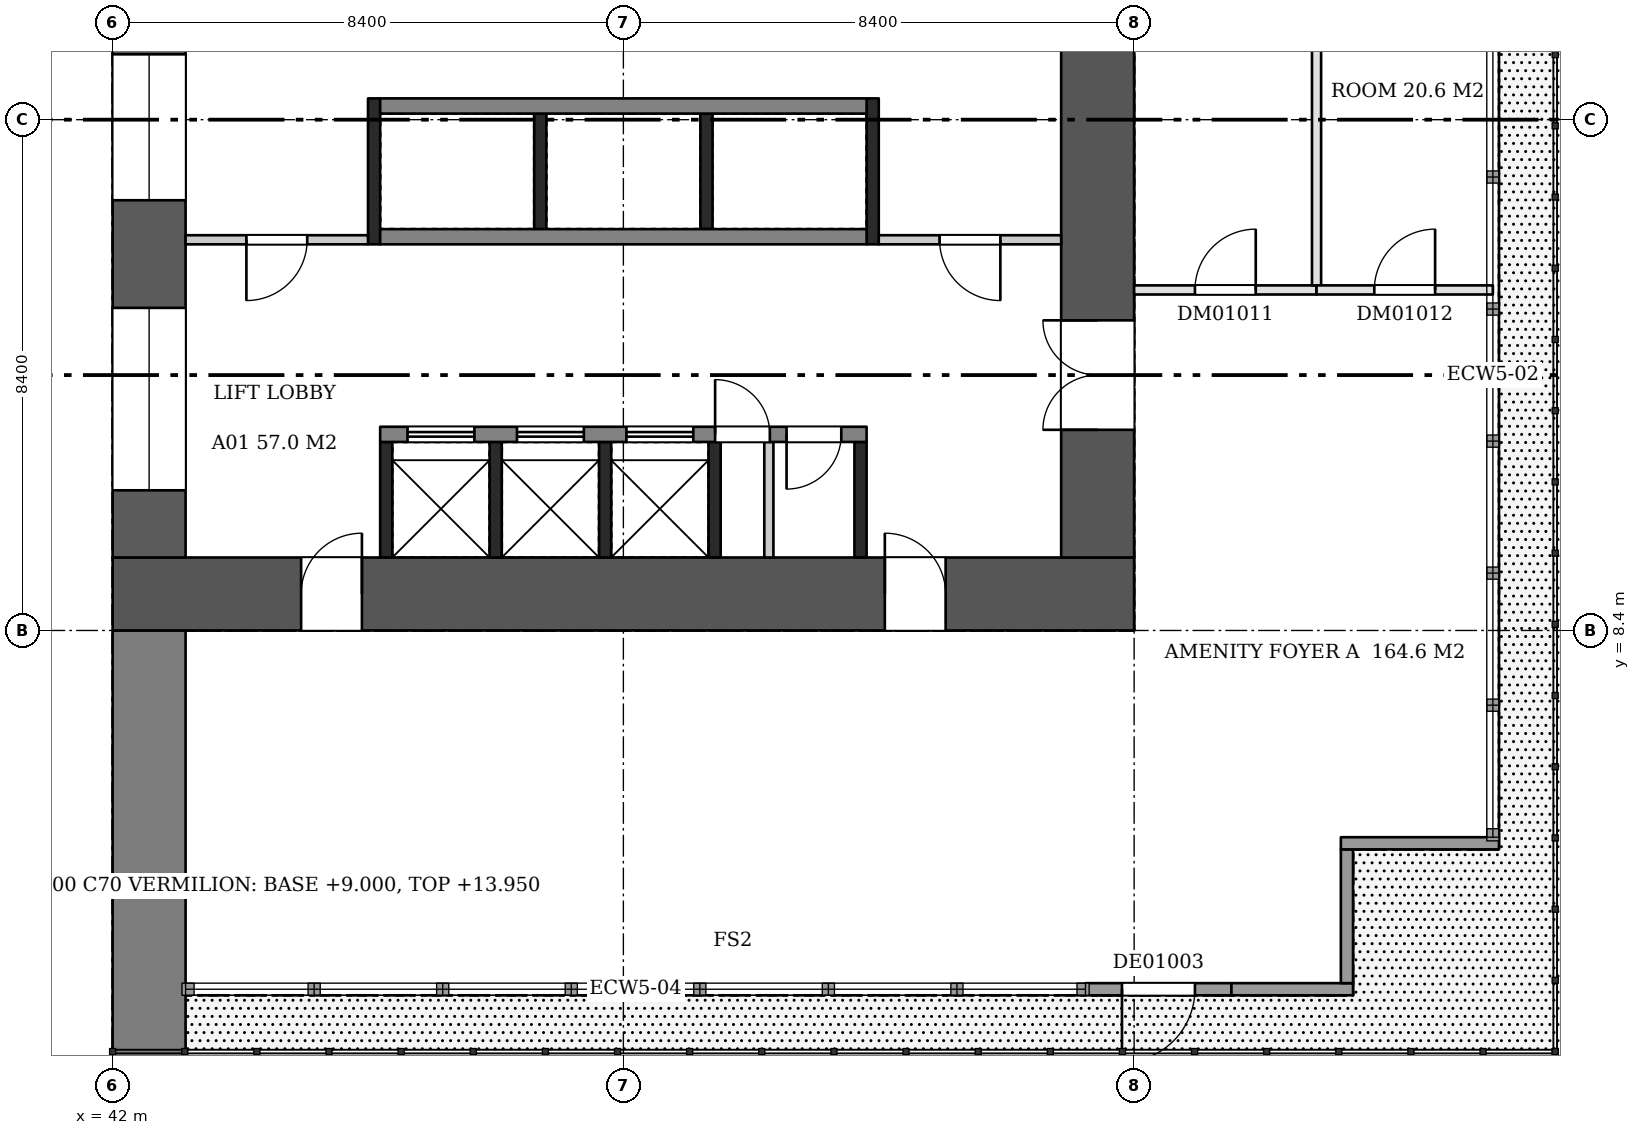
"""IFC4 building model, lengths in metres.
Left out: names, types, materials, properties, quantities, classifications, styles, units other than length and angle.
Written with IfcOpenShell. Run it as: python <this file> out.ifc"""

import sys

from ifc_helpers import new_model, si_unit, direction, frame, frame_2d, origin, place, context, subcontext, project, spatial, rectangle, extrude, element, fill, save


model = new_model("IFC4")
c1 = context("Model", 3, precision=1e-05, world=origin(), true_north=direction((0.0, 1.0)))
c2 = subcontext(c1, "Body", "Model", "MODEL_VIEW")
j1 = project(units=[si_unit("LENGTHUNIT", "METRE"), si_unit("PLANEANGLEUNIT", "RADIAN")], contexts=[c1])
p1 = place(None, origin())
s1 = spatial("IfcSite", under=j1, at=p1, CompositionType="ELEMENT")
p2 = place(p1, origin())
s2 = spatial("IfcBuilding", under=s1, at=p2, CompositionType="ELEMENT")
p3 = place(p2, frame((0.0, 0.0, 9.0)))
s3 = spatial("IfcBuildingStorey", under=s2, at=p3, CompositionType="ELEMENT", Elevation=9.0)
p4 = place(p3, frame((42.6, 0.0, 0.0), z_axis=(0.0, 0.0, 1.0), x_axis=(0.0, 1.0, 0.0)))
e1 = element("IfcWall", 1, at=p4, inside=s3, PredefinedType="SHEAR", context=c2, shape_type="SweptSolid", body=[
    extrude(rectangle(XDim=8.4, YDim=1.2, at=frame_2d((4.2, 0.0))), origin(), (0.0, 0.0, 1.0), 4.95),
])
p5 = place(p3, frame((42.0, 9.0, 0.0), z_axis=(0.0, 0.0, 1.0), x_axis=(1.0, 0.0, 0.0)))
e2 = element("IfcWall", 2, at=p5, inside=s3, PredefinedType="SHEAR", context=c2, shape_type="SweptSolid", body=[
    extrude(rectangle(XDim=16.8, YDim=1.2, at=frame_2d((8.4, 0.0))), origin(), (0.0, 0.0, 1.0), 4.98),
])
p6 = place(p5, frame((3.1, 0.0, 0.0)))
e3 = element("IfcOpeningElement", 3, at=p6, cuts=e2, PredefinedType="OPENING", context=c2, shape_type="SweptSolid", body=[
    extrude(rectangle(XDim=1.0, YDim=2.1, at=frame_2d((0.5, 1.05))), frame((0.0, 0.61, 0.0), z_axis=(0.0, -1.0, 0.0), x_axis=(1.0, 0.0, 0.0)), (0.0, 0.0, 1.0), 1.22),
])
p7 = place(p5, frame((12.7, 0.0, 0.0)))
e4 = element("IfcOpeningElement", 4, at=p7, cuts=e2, PredefinedType="OPENING", context=c2, shape_type="SweptSolid", body=[
    extrude(rectangle(XDim=1.0, YDim=2.1, at=frame_2d((0.5, 1.05))), frame((0.0, 0.61, 0.0), z_axis=(0.0, -1.0, 0.0), x_axis=(1.0, 0.0, 0.0)), (0.0, 0.0, 1.0), 1.22),
])
p8 = place(p3, frame((42.6, 9.6, 0.0), z_axis=(0.0, 0.0, 1.0), x_axis=(0.0, 1.0, 0.0)))
e5 = element("IfcWall", 5, at=p8, inside=s3, PredefinedType="SHEAR", context=c2, shape_type="SweptSolid", body=[
    extrude(rectangle(XDim=14.4, YDim=1.2, at=frame_2d((7.2, 0.0))), origin(), (0.0, 0.0, 1.0), 4.98),
])
p9 = place(p8, frame((1.105, 0.0, 0.6)))
e6 = element("IfcOpeningElement", 6, at=p9, cuts=e5, PredefinedType="OPENING", context=c2, shape_type="SweptSolid", body=[
    extrude(rectangle(XDim=3.0, YDim=2.1, at=frame_2d((1.5, 1.05))), frame((0.0, 0.61, 0.0), z_axis=(0.0, -1.0, 0.0), x_axis=(1.0, 0.0, 0.0)), (0.0, 0.0, 1.0), 1.22),
])
p10 = place(p8, frame((5.875, 0.0, 0.6)))
e7 = element("IfcOpeningElement", 7, at=p10, cuts=e5, PredefinedType="OPENING", context=c2, shape_type="SweptSolid", body=[
    extrude(rectangle(XDim=2.4, YDim=2.1, at=frame_2d((1.2, 1.05))), frame((0.0, 0.61, 0.0), z_axis=(0.0, -1.0, 0.0), x_axis=(1.0, 0.0, 0.0)), (0.0, 0.0, 1.0), 1.22),
])
p11 = place(p8, frame((9.993, 0.0, 0.5)))
e8 = element("IfcOpeningElement", 8, at=p11, cuts=e5, PredefinedType="OPENING", context=c2, shape_type="SweptSolid", body=[
    extrude(rectangle(XDim=1.2, YDim=2.4, at=frame_2d((0.6, 1.2))), frame((0.0, 0.61, 0.0), z_axis=(0.0, -1.0, 0.0), x_axis=(1.0, 0.0, 0.0)), (0.0, 0.0, 1.0), 1.22),
])
p12 = place(p8, frame((12.197, 0.0, 0.5)))
e9 = element("IfcOpeningElement", 9, at=p12, cuts=e5, PredefinedType="OPENING", context=c2, shape_type="SweptSolid", body=[
    extrude(rectangle(XDim=1.2, YDim=2.4, at=frame_2d((0.6, 1.2))), frame((0.0, 0.61, 0.0), z_axis=(0.0, -1.0, 0.0), x_axis=(1.0, 0.0, 0.0)), (0.0, 0.0, 1.0), 1.22),
])
p13 = place(p3, frame((58.2, 9.6, 0.0), z_axis=(0.0, 0.0, 1.0), x_axis=(0.0, 1.0, 0.0)))
e10 = element("IfcWall", 10, at=p13, inside=s3, PredefinedType="SHEAR", context=c2, shape_type="SweptSolid", body=[
    extrude(rectangle(XDim=14.4, YDim=1.2, at=frame_2d((7.2, 0.0))), origin(), (0.0, 0.0, 1.0), 4.98),
])
p14 = place(p13, frame((2.1, 0.0, 0.0)))
e11 = element("IfcOpeningElement", 11, at=p14, cuts=e10, PredefinedType="OPENING", context=c2, shape_type="SweptSolid", body=[
    extrude(rectangle(XDim=1.8, YDim=2.1, at=frame_2d((0.9, 1.05))), frame((0.0, 0.61, 0.0), z_axis=(0.0, -1.0, 0.0), x_axis=(1.0, 0.0, 0.0)), (0.0, 0.0, 1.0), 1.22),
])
for number, where, z_axis, x_axis in (
    (12, (46.5, 9.6, 0.0), (0.0, 0.0, 1.0), (0.0, 1.0, 0.0)),
    (13, (48.3, 9.6, 0.0), (0.0, 0.0, 1.0), (0.0, 1.0, 0.0)),
    (14, (50.1, 9.6, 0.0), (0.0, 0.0, 1.0), (0.0, 1.0, 0.0)),
    (15, (51.9, 9.6, 0.0), (0.0, 0.0, 1.0), (0.0, 1.0, 0.0)),
    (16, (54.3, 9.6, 0.0), (0.0, 0.0, 1.0), (0.0, 1.0, 0.0)),
):
    element("IfcWall", number, at=place(p3, frame(where, z_axis=z_axis, x_axis=x_axis)), inside=s3, PredefinedType="SHEAR", context=c2, shape_type="SweptSolid", body=[
        extrude(rectangle(XDim=1.9, YDim=0.2, at=frame_2d((0.95, 0.0))), origin(), (0.0, 0.0, 1.0), 4.98),
    ])
p15 = place(p3, frame((52.792, 9.6, 0.0), z_axis=(0.0, 0.0, 1.0), x_axis=(0.0, 1.0, 0.0)))
e17 = element("IfcWall", 17, at=p15, inside=s3, PredefinedType="PARTITIONING", context=c2, shape_type="SweptSolid", body=[
    extrude(rectangle(XDim=1.9, YDim=0.15, at=frame_2d((0.95, 0.0))), origin(), (0.0, 0.0, 1.0), 4.98),
])
p16 = place(p3, frame((46.4, 11.625, 0.0), z_axis=(0.0, 0.0, 1.0), x_axis=(1.0, 0.0, 0.0)))
e18 = element("IfcWall", 18, at=p16, inside=s3, PredefinedType="SHEAR", context=c2, shape_type="SweptSolid", body=[
    extrude(rectangle(XDim=8.0, YDim=0.25, at=frame_2d((4.0, 0.0))), origin(), (0.0, 0.0, 1.0), 4.98),
])
p17 = place(p16, frame((0.45, 0.0, 0.0)))
e19 = element("IfcOpeningElement", 19, at=p17, cuts=e18, PredefinedType="OPENING", context=c2, shape_type="SweptSolid", body=[
    extrude(rectangle(XDim=1.1, YDim=2.1, at=frame_2d((0.55, 1.05))), frame((0.0, 0.135, 0.0), z_axis=(0.0, -1.0, 0.0), x_axis=(1.0, 0.0, 0.0)), (0.0, 0.0, 1.0), 0.27),
])
p18 = place(p16, frame((2.25, 0.0, 0.0)))
e20 = element("IfcOpeningElement", 20, at=p18, cuts=e18, PredefinedType="OPENING", context=c2, shape_type="SweptSolid", body=[
    extrude(rectangle(XDim=1.1, YDim=2.1, at=frame_2d((0.55, 1.05))), frame((0.0, 0.135, 0.0), z_axis=(0.0, -1.0, 0.0), x_axis=(1.0, 0.0, 0.0)), (0.0, 0.0, 1.0), 0.27),
])
p19 = place(p16, frame((4.05, 0.0, 0.0)))
e21 = element("IfcOpeningElement", 21, at=p19, cuts=e18, PredefinedType="OPENING", context=c2, shape_type="SweptSolid", body=[
    extrude(rectangle(XDim=1.1, YDim=2.1, at=frame_2d((0.55, 1.05))), frame((0.0, 0.135, 0.0), z_axis=(0.0, -1.0, 0.0), x_axis=(1.0, 0.0, 0.0)), (0.0, 0.0, 1.0), 0.27),
])
p20 = place(p16, frame((5.509, 0.0, 0.0)))
e22 = element("IfcOpeningElement", 22, at=p20, cuts=e18, PredefinedType="OPENING", context=c2, shape_type="SweptSolid", body=[
    extrude(rectangle(XDim=0.9, YDim=2.1, at=frame_2d((0.45, 1.05))), frame((0.0, 0.135, 0.0), z_axis=(0.0, -1.0, 0.0), x_axis=(1.0, 0.0, 0.0)), (0.0, 0.0, 1.0), 0.27),
])
p21 = place(p16, frame((6.684, 0.0, 0.0)))
e23 = element("IfcOpeningElement", 23, at=p21, cuts=e18, PredefinedType="OPENING", context=c2, shape_type="SweptSolid", body=[
    extrude(rectangle(XDim=0.9, YDim=2.1, at=frame_2d((0.45, 1.05))), frame((0.0, 0.135, 0.0), z_axis=(0.0, -1.0, 0.0), x_axis=(1.0, 0.0, 0.0)), (0.0, 0.0, 1.0), 0.27),
])
for number, where, z_axis, x_axis in (
    (24, (49.033, 15.0, 0.0), (0.0, 0.0, 1.0), (0.0, 1.0, 0.0)),
    (25, (51.767, 15.0, 0.0), (0.0, 0.0, 1.0), (0.0, 1.0, 0.0)),
):
    element("IfcWall", number, at=place(p3, frame(where, z_axis=z_axis, x_axis=x_axis)), inside=s3, PredefinedType="SHEAR", context=c2, shape_type="SweptSolid", body=[
        extrude(rectangle(XDim=1.9, YDim=0.2, at=frame_2d((0.95, 0.0))), origin(), (0.0, 0.0, 1.0), 4.98),
    ])
for number, where, z_axis, x_axis in (
    (26, (46.4, 14.875, 0.0), (0.0, 0.0, 1.0), (1.0, 0.0, 0.0)),
    (27, (46.4, 17.025, 0.0), (0.0, 0.0, 1.0), (1.0, 0.0, 0.0)),
):
    element("IfcWall", number, at=place(p3, frame(where, z_axis=z_axis, x_axis=x_axis)), inside=s3, PredefinedType="SHEAR", context=c2, shape_type="SweptSolid", body=[
        extrude(rectangle(XDim=8.0, YDim=0.25, at=frame_2d((4.0, 0.0))), origin(), (0.0, 0.0, 1.0), 4.98),
    ])
p22 = place(p3, frame((46.3, 14.75, 0.0), z_axis=(0.0, 0.0, 1.0), x_axis=(0.0, 1.0, 0.0)))
e28 = element("IfcWall", 28, at=p22, inside=s3, PredefinedType="SHEAR", context=c2, shape_type="SweptSolid", body=[
    extrude(rectangle(XDim=2.4, YDim=0.2, at=frame_2d((1.2, 0.0))), origin(), (0.0, 0.0, 1.0), 4.98),
])
p23 = place(p3, frame((43.2, 14.825, 0.0), z_axis=(0.0, 0.0, 1.0), x_axis=(1.0, 0.0, 0.0)))
e29 = element("IfcWall", 29, at=p23, inside=s3, PredefinedType="PARTITIONING", context=c2, shape_type="SweptSolid", body=[
    extrude(rectangle(XDim=3.0, YDim=0.15, at=frame_2d((1.5, 0.0))), origin(), (0.0, 0.0, 1.0), 4.98),
])
p24 = place(p23, frame((1.0, 0.0, 0.0)))
e30 = element("IfcOpeningElement", 30, at=p24, cuts=e29, PredefinedType="OPENING", context=c2, shape_type="SweptSolid", body=[
    extrude(rectangle(XDim=1.0, YDim=2.1, at=frame_2d((0.5, 1.05))), frame((0.0, 0.085, 0.0), z_axis=(0.0, -1.0, 0.0), x_axis=(1.0, 0.0, 0.0)), (0.0, 0.0, 1.0), 0.17),
])
p25 = place(p3, frame((54.5, 14.75, 0.0), z_axis=(0.0, 0.0, 1.0), x_axis=(0.0, 1.0, 0.0)))
e31 = element("IfcWall", 31, at=p25, inside=s3, PredefinedType="SHEAR", context=c2, shape_type="SweptSolid", body=[
    extrude(rectangle(XDim=2.4, YDim=0.2, at=frame_2d((1.2, 0.0))), origin(), (0.0, 0.0, 1.0), 4.98),
])
p26 = place(p3, frame((54.6, 14.825, 0.0), z_axis=(0.0, 0.0, 1.0), x_axis=(1.0, 0.0, 0.0)))
e32 = element("IfcWall", 32, at=p26, inside=s3, PredefinedType="PARTITIONING", context=c2, shape_type="SweptSolid", body=[
    extrude(rectangle(XDim=3.0, YDim=0.15, at=frame_2d((1.5, 0.0))), origin(), (0.0, 0.0, 1.0), 4.98),
])
p27 = place(p26, frame((1.0, 0.0, 0.0)))
e33 = element("IfcOpeningElement", 33, at=p27, cuts=e32, PredefinedType="OPENING", context=c2, shape_type="SweptSolid", body=[
    extrude(rectangle(XDim=1.0, YDim=2.1, at=frame_2d((0.5, 1.05))), frame((0.0, 0.085, 0.0), z_axis=(0.0, -1.0, 0.0), x_axis=(1.0, 0.0, 0.0)), (0.0, 0.0, 1.0), 0.17),
])
p28 = place(p3, frame((58.8, 14.0, 0.0), z_axis=(0.0, 0.0, 1.0), x_axis=(1.0, 0.0, 0.0)))
e34 = element("IfcWall", 34, at=p28, inside=s3, PredefinedType="PARTITIONING", context=c2, shape_type="SweptSolid", body=[
    extrude(rectangle(XDim=3.0, YDim=0.15, at=frame_2d((1.5, 0.0))), origin(), (0.0, 0.0, 1.0), 4.95),
])
p29 = place(p28, frame((1.0, 0.0, 0.0)))
e35 = element("IfcOpeningElement", 35, at=p29, cuts=e34, PredefinedType="OPENING", context=c2, shape_type="SweptSolid", body=[
    extrude(rectangle(XDim=1.0, YDim=2.1, at=frame_2d((0.5, 1.05))), frame((0.0, 0.085, 0.0), z_axis=(0.0, -1.0, 0.0), x_axis=(1.0, 0.0, 0.0)), (0.0, 0.0, 1.0), 0.17),
])
p30 = place(p3, frame((61.8, 14.075, 0.0), z_axis=(0.0, 0.0, 1.0), x_axis=(0.0, 1.0, 0.0)))
e36 = element("IfcWall", 36, at=p30, inside=s3, PredefinedType="PARTITIONING", context=c2, shape_type="SweptSolid", body=[
    extrude(rectangle(XDim=8.625, YDim=0.15, at=frame_2d((4.312, 0.0))), origin(), (0.0, 0.0, 1.0), 4.95),
])
p31 = place(p3, frame((61.8, 14.0, 0.0), z_axis=(0.0, 0.0, 1.0), x_axis=(1.0, 0.0, 0.0)))
e37 = element("IfcWall", 37, at=p31, inside=s3, PredefinedType="PARTITIONING", context=c2, shape_type="SweptSolid", body=[
    extrude(rectangle(XDim=2.9, YDim=0.15, at=frame_2d((1.45, 0.0))), origin(), (0.0, 0.0, 1.0), 4.95),
])
p32 = place(p31, frame((0.95, 0.0, 0.0)))
e38 = element("IfcOpeningElement", 38, at=p32, cuts=e37, PredefinedType="OPENING", context=c2, shape_type="SweptSolid", body=[
    extrude(rectangle(XDim=1.0, YDim=2.1, at=frame_2d((0.5, 1.05))), frame((0.0, 0.085, 0.0), z_axis=(0.0, -1.0, 0.0), x_axis=(1.0, 0.0, 0.0)), (0.0, 0.0, 1.0), 0.17),
])
p33 = place(p3, frame((58.0, 2.5, 0.0), z_axis=(0.0, 0.0, 1.0), x_axis=(1.0, 0.0, 0.0)))
e39 = element("IfcWall", 39, at=p33, inside=s3, PredefinedType="SOLIDWALL", context=c2, shape_type="SweptSolid", body=[
    extrude(rectangle(XDim=2.4, YDim=0.2, at=frame_2d((1.2, 0.0))), origin(), (0.0, 0.0, 1.0), 4.95),
])
p34 = place(p33, frame((0.6, 0.0, 0.0)))
e40 = element("IfcOpeningElement", 40, at=p34, cuts=e39, PredefinedType="OPENING", context=c2, shape_type="SweptSolid", body=[
    extrude(rectangle(XDim=1.2, YDim=2.4, at=frame_2d((0.6, 1.2))), frame((0.0, 0.11, 0.0), z_axis=(0.0, -1.0, 0.0), x_axis=(1.0, 0.0, 0.0)), (0.0, 0.0, 1.0), 0.22),
])
p35 = place(p3, frame((60.4, 2.5, 0.0), z_axis=(0.0, 0.0, 1.0), x_axis=(1.0, 0.0, 0.0)))
e41 = element("IfcWall", 41, at=p35, inside=s3, PredefinedType="SOLIDWALL", context=c2, shape_type="SweptSolid", body=[
    extrude(rectangle(XDim=2.0, YDim=0.2, at=frame_2d((1.0, 0.0))), origin(), (0.0, 0.0, 1.0), 4.95),
])
p36 = place(p3, frame((62.3, 2.6, 0.0), z_axis=(0.0, 0.0, 1.0), x_axis=(0.0, 1.0, 0.0)))
e42 = element("IfcWall", 42, at=p36, inside=s3, PredefinedType="SOLIDWALL", context=c2, shape_type="SweptSolid", body=[
    extrude(rectangle(XDim=2.2, YDim=0.2, at=frame_2d((1.1, 0.0))), origin(), (0.0, 0.0, 1.0), 4.95),
])
p37 = place(p3, frame((62.2, 4.9, 0.0), z_axis=(0.0, 0.0, 1.0), x_axis=(1.0, 0.0, 0.0)))
e43 = element("IfcWall", 43, at=p37, inside=s3, PredefinedType="SOLIDWALL", context=c2, shape_type="SweptSolid", body=[
    extrude(rectangle(XDim=2.6, YDim=0.2, at=frame_2d((1.3, 0.0))), origin(), (0.0, 0.0, 1.0), 4.95),
])
p38 = place(p6, origin())
e44 = element("IfcDoor", 44, at=p38, inside=s3, OperationType="SINGLE_SWING_RIGHT", PredefinedType="DOOR", context=c2, shape_type="SweptSolid", body=[
    extrude(rectangle(XDim=1.0, YDim=2.1, at=frame_2d((0.5, 1.05))), frame((0.0, 0.025, 0.0), z_axis=(0.0, -1.0, 0.0), x_axis=(1.0, 0.0, 0.0)), (0.0, 0.0, 1.0), 0.05),
])
fill(e3, e44)
p39 = place(p7, origin())
e45 = element("IfcDoor", 45, at=p39, inside=s3, OperationType="SINGLE_SWING_LEFT", PredefinedType="DOOR", context=c2, shape_type="SweptSolid", body=[
    extrude(rectangle(XDim=1.0, YDim=2.1, at=frame_2d((0.5, 1.05))), frame((0.0, 0.025, 0.0), z_axis=(0.0, -1.0, 0.0), x_axis=(1.0, 0.0, 0.0)), (0.0, 0.0, 1.0), 0.05),
])
fill(e4, e45)
p40 = place(p14, origin())
e46 = element("IfcDoor", 46, at=p40, inside=s3, OperationType="DOUBLE_DOOR_SINGLE_SWING", PredefinedType="DOOR", context=c2, shape_type="SweptSolid", body=[
    extrude(rectangle(XDim=1.8, YDim=2.1, at=frame_2d((0.9, 1.05))), frame((0.0, 0.025, 0.0), z_axis=(0.0, -1.0, 0.0), x_axis=(1.0, 0.0, 0.0)), (0.0, 0.0, 1.0), 0.05),
])
fill(e11, e46)
p41 = place(p17, origin())
e47 = element("IfcDoor", 47, at=p41, inside=s3, OperationType="DOUBLE_DOOR_SLIDING", PredefinedType="DOOR", context=c2, shape_type="SweptSolid", body=[
    extrude(rectangle(XDim=1.1, YDim=2.1, at=frame_2d((0.55, 1.05))), frame((0.0, 0.025, 0.0), z_axis=(0.0, -1.0, 0.0), x_axis=(1.0, 0.0, 0.0)), (0.0, 0.0, 1.0), 0.05),
])
fill(e19, e47)
p42 = place(p18, origin())
e48 = element("IfcDoor", 48, at=p42, inside=s3, OperationType="DOUBLE_DOOR_SLIDING", PredefinedType="DOOR", context=c2, shape_type="SweptSolid", body=[
    extrude(rectangle(XDim=1.1, YDim=2.1, at=frame_2d((0.55, 1.05))), frame((0.0, 0.025, 0.0), z_axis=(0.0, -1.0, 0.0), x_axis=(1.0, 0.0, 0.0)), (0.0, 0.0, 1.0), 0.05),
])
fill(e20, e48)
p43 = place(p19, origin())
e49 = element("IfcDoor", 49, at=p43, inside=s3, OperationType="DOUBLE_DOOR_SLIDING", PredefinedType="DOOR", context=c2, shape_type="SweptSolid", body=[
    extrude(rectangle(XDim=1.1, YDim=2.1, at=frame_2d((0.55, 1.05))), frame((0.0, 0.025, 0.0), z_axis=(0.0, -1.0, 0.0), x_axis=(1.0, 0.0, 0.0)), (0.0, 0.0, 1.0), 0.05),
])
fill(e21, e49)
p44 = place(p20, origin())
e50 = element("IfcDoor", 50, at=p44, inside=s3, OperationType="SINGLE_SWING_LEFT", PredefinedType="DOOR", context=c2, shape_type="SweptSolid", body=[
    extrude(rectangle(XDim=0.9, YDim=2.1, at=frame_2d((0.45, 1.05))), frame((0.0, 0.025, 0.0), z_axis=(0.0, -1.0, 0.0), x_axis=(1.0, 0.0, 0.0)), (0.0, 0.0, 1.0), 0.05),
])
fill(e22, e50)
p45 = place(p21, frame((0.9, 0.0, 0.0), z_axis=(0.0, 0.0, 1.0), x_axis=(-1.0, 0.0, 0.0)))
e51 = element("IfcDoor", 51, at=p45, inside=s3, OperationType="SINGLE_SWING_RIGHT", PredefinedType="DOOR", context=c2, shape_type="SweptSolid", body=[
    extrude(rectangle(XDim=0.9, YDim=2.1, at=frame_2d((0.45, 1.05))), frame((0.0, 0.025, 0.0), z_axis=(0.0, -1.0, 0.0), x_axis=(1.0, 0.0, 0.0)), (0.0, 0.0, 1.0), 0.05),
])
fill(e23, e51)
p46 = place(p24, frame((1.0, 0.0, 0.0), z_axis=(0.0, 0.0, 1.0), x_axis=(-1.0, 0.0, 0.0)))
e52 = element("IfcDoor", 52, at=p46, inside=s3, OperationType="SINGLE_SWING_RIGHT", PredefinedType="DOOR", context=c2, shape_type="SweptSolid", body=[
    extrude(rectangle(XDim=1.0, YDim=2.1, at=frame_2d((0.5, 1.05))), frame((0.0, 0.025, 0.0), z_axis=(0.0, -1.0, 0.0), x_axis=(1.0, 0.0, 0.0)), (0.0, 0.0, 1.0), 0.05),
])
fill(e30, e52)
p47 = place(p27, frame((1.0, 0.0, 0.0), z_axis=(0.0, 0.0, 1.0), x_axis=(-1.0, 0.0, 0.0)))
e53 = element("IfcDoor", 53, at=p47, inside=s3, OperationType="SINGLE_SWING_LEFT", PredefinedType="DOOR", context=c2, shape_type="SweptSolid", body=[
    extrude(rectangle(XDim=1.0, YDim=2.1, at=frame_2d((0.5, 1.05))), frame((0.0, 0.025, 0.0), z_axis=(0.0, -1.0, 0.0), x_axis=(1.0, 0.0, 0.0)), (0.0, 0.0, 1.0), 0.05),
])
fill(e33, e53)
p48 = place(p9, origin())
e54 = element("IfcWindow", 54, at=p48, inside=s3, PartitioningType="SINGLE_PANEL", PredefinedType="WINDOW", context=c2, shape_type="SweptSolid", body=[
    extrude(rectangle(XDim=3.0, YDim=2.1, at=frame_2d((1.5, 1.05))), frame((0.0, 0.03, 0.0), z_axis=(0.0, -1.0, 0.0), x_axis=(1.0, 0.0, 0.0)), (0.0, 0.0, 1.0), 0.06),
])
fill(e6, e54)
p49 = place(p10, origin())
e55 = element("IfcWindow", 55, at=p49, inside=s3, PartitioningType="SINGLE_PANEL", PredefinedType="WINDOW", context=c2, shape_type="SweptSolid", body=[
    extrude(rectangle(XDim=2.4, YDim=2.1, at=frame_2d((1.2, 1.05))), frame((0.0, 0.03, 0.0), z_axis=(0.0, -1.0, 0.0), x_axis=(1.0, 0.0, 0.0)), (0.0, 0.0, 1.0), 0.06),
])
fill(e7, e55)
p50 = place(p29, origin())
e56 = element("IfcDoor", 56, at=p50, inside=s3, OperationType="SINGLE_SWING_RIGHT", PredefinedType="DOOR", context=c2, shape_type="SweptSolid", body=[
    extrude(rectangle(XDim=1.0, YDim=2.1, at=frame_2d((0.5, 1.05))), frame((0.0, 0.025, 0.0), z_axis=(0.0, -1.0, 0.0), x_axis=(1.0, 0.0, 0.0)), (0.0, 0.0, 1.0), 0.05),
])
fill(e35, e56)
p51 = place(p32, origin())
e57 = element("IfcDoor", 57, at=p51, inside=s3, OperationType="SINGLE_SWING_RIGHT", PredefinedType="DOOR", context=c2, shape_type="SweptSolid", body=[
    extrude(rectangle(XDim=1.0, YDim=2.1, at=frame_2d((0.5, 1.05))), frame((0.0, 0.025, 0.0), z_axis=(0.0, -1.0, 0.0), x_axis=(1.0, 0.0, 0.0)), (0.0, 0.0, 1.0), 0.05),
])
fill(e38, e57)
p52 = place(p34, frame((1.2, 0.0, 0.0), z_axis=(0.0, 0.0, 1.0), x_axis=(-1.0, 0.0, 0.0)))
e58 = element("IfcDoor", 58, at=p52, inside=s3, OperationType="SINGLE_SWING_RIGHT", PredefinedType="DOOR", context=c2, shape_type="SweptSolid", body=[
    extrude(rectangle(XDim=1.2, YDim=2.4, at=frame_2d((0.6, 1.2))), frame((0.0, 0.025, 0.0), z_axis=(0.0, -1.0, 0.0), x_axis=(1.0, 0.0, 0.0)), (0.0, 0.0, 1.0), 0.05),
])
fill(e40, e58)
save(model, sys.argv[1])
